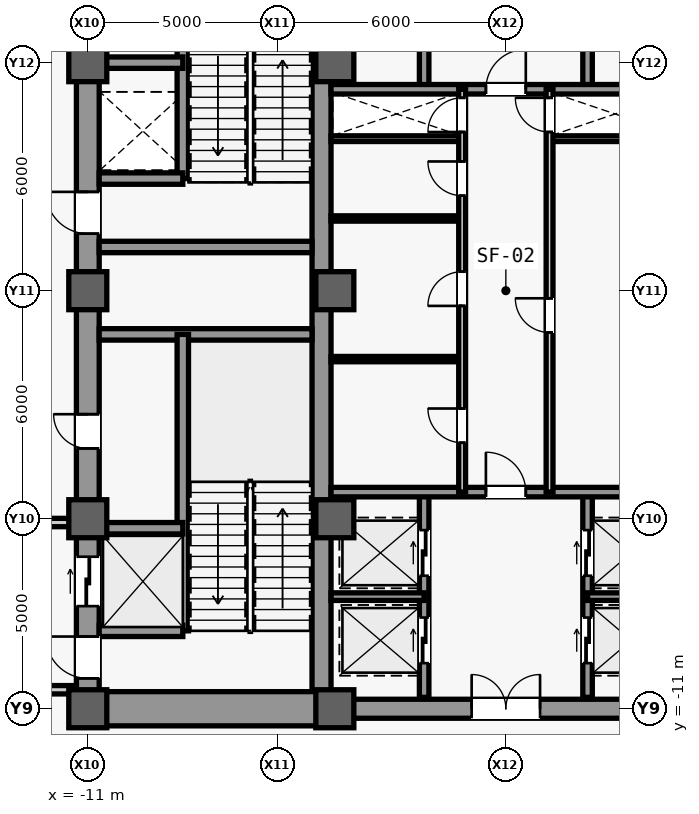
"""IFC4 building model, lengths in metres.
Left out: names, types, materials, properties, quantities, classifications, styles, units other than length and angle.
Written with IfcOpenShell. Run it as: python <this file> out.ifc"""

import sys

from ifc_helpers import new_model, si_unit, direction, frame, frame_2d, origin, origin_2d, place, context, subcontext, project, spatial, rectangle, extrude, source, transform, mapped, element, fill, save


model = new_model("IFC4")
c1 = context("Model", 3, precision=1e-05, world=origin(), true_north=direction((0.0, 1.0)))
c2 = subcontext(c1, "Body", "Model", "MODEL_VIEW")
j1 = project(units=[si_unit("LENGTHUNIT", "METRE"), si_unit("PLANEANGLEUNIT", "RADIAN")], contexts=[c1])
p1 = place(None, origin())
s1 = spatial("IfcSite", under=j1, at=p1, CompositionType="ELEMENT")
p2 = place(p1, origin())
s2 = spatial("IfcBuilding", under=s1, at=p2, CompositionType="ELEMENT")
p3 = place(p2, frame((0.0, 0.0, 6.6)))
s3 = spatial("IfcBuildingStorey", under=s2, at=p3, CompositionType="ELEMENT", Elevation=6.6)
m1 = source(origin(), c2, "Body", "SweptSolid", [
    extrude(rectangle(XDim=22.0, YDim=0.6, at=frame_2d((11.0, 0.0))), origin(), (0.0, 0.0, 1.0), 5.08),
])
p4 = place(p3, frame((-11.0, -11.0, 0.0), z_axis=(0.0, 0.0, 1.0), x_axis=(0.0, 1.0, 0.0)))
e1 = element("IfcWall", 1, at=p4, inside=s3, PredefinedType="SHEAR", context=c2, shape_type="MappedRepresentation", body=[
    mapped(m1, transform((0.0, 0.0, 0.0), scale=1.0)),
])
m2 = source(origin(), c2, "Body", "SweptSolid", [
    extrude(rectangle(XDim=1.1, YDim=2.2, at=frame_2d((0.55, 1.1))), frame((0.0, 0.31, 0.0), z_axis=(0.0, -1.0, 0.0), x_axis=(1.0, 0.0, 0.0)), (0.0, 0.0, 1.0), 0.62),
])
p5 = place(p4, frame((0.8, 0.0, 0.0)))
e2 = element("IfcOpeningElement", 2, at=p5, cuts=e1, PredefinedType="OPENING", context=c2, shape_type="MappedRepresentation", body=[
    mapped(m2, transform((0.0, 0.0, 0.0), scale=1.0)),
])
p6 = place(p4, frame((12.5, 0.0, 0.0)))
e3 = element("IfcOpeningElement", 3, at=p6, cuts=e1, PredefinedType="OPENING", context=c2, shape_type="MappedRepresentation", body=[
    mapped(m2, transform((0.0, 0.0, 0.0), scale=1.0)),
])
m3 = source(origin(), c2, "Body", "SweptSolid", [
    extrude(rectangle(XDim=0.9, YDim=2.15, at=frame_2d((0.45, 1.075))), frame((0.0, 0.31, 0.0), z_axis=(0.0, -1.0, 0.0), x_axis=(1.0, 0.0, 0.0)), (0.0, 0.0, 1.0), 0.62),
])
p7 = place(p4, frame((6.85, 0.0, 0.0)))
e4 = element("IfcOpeningElement", 4, at=p7, cuts=e1, PredefinedType="OPENING", context=c2, shape_type="MappedRepresentation", body=[
    mapped(m3, transform((0.0, 0.0, 0.0), scale=1.0)),
])
m4 = source(origin(), c2, "Body", "SweptSolid", [
    extrude(rectangle(XDim=1.3, YDim=2.3, at=frame_2d((0.65, 1.15))), frame((0.0, 0.31, 0.0), z_axis=(0.0, -1.0, 0.0), x_axis=(1.0, 0.0, 0.0)), (0.0, 0.0, 1.0), 0.62),
])
p8 = place(p4, frame((2.7, 0.0, 0.0)))
e5 = element("IfcOpeningElement", 5, at=p8, cuts=e1, PredefinedType="OPENING", context=c2, shape_type="MappedRepresentation", body=[
    mapped(m4, transform((0.0, 0.0, 0.0), scale=1.0)),
])
m5 = source(origin(), c2, "Body", "SweptSolid", [
    extrude(rectangle(XDim=21.4, YDim=0.5, at=frame_2d((10.7, 0.0))), origin(), (0.0, 0.0, 1.0), 5.08),
])
p9 = place(p3, frame((-4.85, -10.7, 0.0), z_axis=(0.0, 0.0, 1.0), x_axis=(0.0, 1.0, 0.0)))
e6 = element("IfcWall", 6, at=p9, inside=s3, PredefinedType="SHEAR", context=c2, shape_type="MappedRepresentation", body=[
    mapped(m5, transform((0.0, 0.0, 0.0), scale=1.0)),
])
m6 = source(origin(), c2, "Body", "SweptSolid", [
    extrude(rectangle(XDim=5.85, YDim=0.9, at=frame_2d((2.925, 0.0))), origin(), (0.0, 0.0, 1.0), 5.08),
])
p10 = place(p3, frame((-10.7, -11.0, 0.0), z_axis=(0.0, 0.0, 1.0), x_axis=(1.0, 0.0, 0.0)))
e7 = element("IfcWall", 7, at=p10, inside=s3, PredefinedType="SHEAR", context=c2, shape_type="MappedRepresentation", body=[
    mapped(m6, transform((0.0, 0.0, 0.0), scale=1.0)),
])
m7 = source(origin(), c2, "Body", "SweptSolid", [
    extrude(rectangle(XDim=5.6, YDim=0.3, at=frame_2d((2.8, 0.0))), origin(), (0.0, 0.0, 1.0), 5.08),
])
for number, where, z_axis, x_axis in (
    (8, (-10.7, -1.15, 0.0), (0.0, 0.0, 1.0), (1.0, 0.0, 0.0)),
    (9, (-10.7, 1.15, 0.0), (0.0, 0.0, 1.0), (1.0, 0.0, 0.0)),
):
    element("IfcWall", number, at=place(p3, frame(where, z_axis=z_axis, x_axis=x_axis)), inside=s3, PredefinedType="SHEAR", context=c2, shape_type="MappedRepresentation", body=[
        mapped(m7, transform((0.0, 0.0, 0.0), scale=1.0)),
    ])
m8 = source(origin(), c2, "Body", "SweptSolid", [
    extrude(rectangle(XDim=9.2, YDim=0.5, at=frame_2d((4.6, 0.0))), origin(), (0.0, 0.0, 1.0), 5.08),
])
p11 = place(p3, frame((-4.6, -11.0, 0.0), z_axis=(0.0, 0.0, 1.0), x_axis=(1.0, 0.0, 0.0)))
e10 = element("IfcWall", 10, at=p11, inside=s3, PredefinedType="SHEAR", context=c2, shape_type="MappedRepresentation", body=[
    mapped(m8, transform((0.0, 0.0, 0.0), scale=1.0)),
])
m9 = source(origin(), c2, "Body", "SweptSolid", [
    extrude(rectangle(XDim=1.8, YDim=2.25, at=frame_2d((0.9, 1.125))), frame((0.0, 0.26, 0.0), z_axis=(0.0, -1.0, 0.0), x_axis=(1.0, 0.0, 0.0)), (0.0, 0.0, 1.0), 0.52),
])
p12 = place(p11, frame((3.7, 0.0, 0.0)))
e11 = element("IfcOpeningElement", 11, at=p12, cuts=e10, PredefinedType="OPENING", context=c2, shape_type="MappedRepresentation", body=[
    mapped(m9, transform((0.0, 0.0, 0.0), scale=1.0)),
])
m10 = source(origin(), c2, "Body", "SweptSolid", [
    extrude(rectangle(XDim=1.0, YDim=1.0, at=origin_2d()), origin(), (0.0, 0.0, 1.0), 5.4),
])
for number, where, z_axis, x_axis in (
    (12, (-11.0, -11.0, 0.0), (0.0, 0.0, 1.0), (1.0, 0.0, 0.0)),
    (13, (-11.0, -6.0, 0.0), (0.0, 0.0, 1.0), (1.0, 0.0, 0.0)),
    (14, (-11.0, 0.0, 0.0), (0.0, 0.0, 1.0), (1.0, 0.0, 0.0)),
    (15, (-11.0, 6.0, 0.0), (0.0, 0.0, 1.0), (1.0, 0.0, 0.0)),
    (16, (-4.5, -11.0, 0.0), (0.0, 0.0, 1.0), (1.0, 0.0, 0.0)),
    (17, (-4.5, -6.0, 0.0), (0.0, 0.0, 1.0), (1.0, 0.0, 0.0)),
    (18, (-4.5, 0.0, 0.0), (0.0, 0.0, 1.0), (1.0, 0.0, 0.0)),
    (19, (-4.5, 6.0, 0.0), (0.0, 0.0, 1.0), (1.0, 0.0, 0.0)),
):
    element("IfcColumn", number, at=place(p3, frame(where, z_axis=z_axis, x_axis=x_axis)), inside=s3, PredefinedType="COLUMN", context=c2, shape_type="MappedRepresentation", body=[
        mapped(m10, transform((0.0, 0.0, 0.0), scale=1.0)),
    ])
m11 = source(origin(), c2, "Body", "SweptSolid", [
    extrude(rectangle(XDim=7.8, YDim=0.3, at=frame_2d((3.9, 0.0))), origin(), (0.0, 0.0, 1.0), 5.08),
])
p13 = place(p3, frame((-8.5, -8.95, 0.0), z_axis=(0.0, 0.0, 1.0), x_axis=(0.0, 1.0, 0.0)))
e20 = element("IfcWall", 20, at=p13, inside=s3, PredefinedType="SHEAR", context=c2, shape_type="MappedRepresentation", body=[
    mapped(m11, transform((0.0, 0.0, 0.0), scale=1.0)),
])
m12 = source(origin(), c2, "Body", "SweptSolid", [
    extrude(rectangle(XDim=2.2, YDim=0.3, at=frame_2d((1.1, 0.0))), origin(), (0.0, 0.0, 1.0), 5.08),
])
for number, where, z_axis, x_axis in (
    (21, (-10.7, -8.95, 0.0), (0.0, 0.0, 1.0), (1.0, 0.0, 0.0)),
    (22, (-10.7, -6.25, 0.0), (0.0, 0.0, 1.0), (1.0, 0.0, 0.0)),
):
    element("IfcWall", number, at=place(p3, frame(where, z_axis=z_axis, x_axis=x_axis)), inside=s3, PredefinedType="SHEAR", context=c2, shape_type="MappedRepresentation", body=[
        mapped(m12, transform((0.0, 0.0, 0.0), scale=1.0)),
    ])
m13 = source(origin(), c2, "Body", "SweptSolid", [
    extrude(rectangle(XDim=7.75, YDim=0.3, at=frame_2d((3.875, 0.0))), origin(), (0.0, 0.0, 1.0), 5.08),
])
p14 = place(p3, frame((-8.5, 2.95, 0.0), z_axis=(0.0, 0.0, 1.0), x_axis=(0.0, 1.0, 0.0)))
e23 = element("IfcWall", 23, at=p14, inside=s3, PredefinedType="SHEAR", context=c2, shape_type="MappedRepresentation", body=[
    mapped(m13, transform((0.0, 0.0, 0.0), scale=1.0)),
])
for number, where, z_axis, x_axis in (
    (24, (-10.7, 2.95, 0.0), (0.0, 0.0, 1.0), (1.0, 0.0, 0.0)),
    (25, (-10.7, 6.0, 0.0), (0.0, 0.0, 1.0), (1.0, 0.0, 0.0)),
):
    element("IfcWall", number, at=place(p3, frame(where, z_axis=z_axis, x_axis=x_axis)), inside=s3, PredefinedType="SHEAR", context=c2, shape_type="MappedRepresentation", body=[
        mapped(m12, transform((0.0, 0.0, 0.0), scale=1.0)),
    ])
m14 = source(origin(), c2, "Body", "SweptSolid", [
    extrude(rectangle(XDim=4.05, YDim=0.22, at=frame_2d((2.025, 0.0))), origin(), (0.0, 0.0, 1.0), 5.08),
])
for number, where, z_axis, x_axis in (
    (26, (-15.35, -10.5, 0.0), (0.0, 0.0, 1.0), (1.0, 0.0, 0.0)),
    (27, (-15.35, -6.1, 0.0), (0.0, 0.0, 1.0), (1.0, 0.0, 0.0)),
):
    element("IfcWall", number, at=place(p3, frame(where, z_axis=z_axis, x_axis=x_axis)), inside=s3, PredefinedType="PARTITIONING", context=c2, shape_type="MappedRepresentation", body=[
        mapped(m14, transform((0.0, 0.0, 0.0), scale=1.0)),
    ])
m15 = source(origin(), c2, "Body", "SweptSolid", [
    extrude(rectangle(XDim=3.45, YDim=0.15, at=frame_2d((1.725, 0.0))), origin(), (0.0, 0.0, 1.0), 5.08),
])
for number, where, z_axis, x_axis in (
    (28, (-4.6, 4.0, 0.0), (0.0, 0.0, 1.0), (1.0, 0.0, 0.0)),
    (29, (1.15, 4.0, 0.0), (0.0, 0.0, 1.0), (1.0, 0.0, 0.0)),
):
    element("IfcWall", number, at=place(p3, frame(where, z_axis=z_axis, x_axis=x_axis)), inside=s3, PredefinedType="PARTITIONING", context=c2, shape_type="MappedRepresentation", body=[
        mapped(m15, transform((0.0, 0.0, 0.0), scale=1.0)),
    ])
m16 = source(origin(), c2, "Body", "SweptSolid", [
    extrude(rectangle(XDim=5.4, YDim=0.25, at=frame_2d((2.7, 0.0))), origin(), (0.0, 0.0, 1.0), 5.08),
])
p15 = place(p3, frame((-2.15, -10.7, 0.0), z_axis=(0.0, 0.0, 1.0), x_axis=(0.0, 1.0, 0.0)))
e30 = element("IfcWall", 30, at=p15, inside=s3, PredefinedType="SHEAR", context=c2, shape_type="MappedRepresentation", body=[
    mapped(m16, transform((0.0, 0.0, 0.0), scale=1.0)),
])
m17 = source(origin(), c2, "Body", "SweptSolid", [
    extrude(rectangle(XDim=1.2, YDim=2.3, at=frame_2d((0.6, 1.15))), frame((0.0, 0.135, 0.0), z_axis=(0.0, -1.0, 0.0), x_axis=(1.0, 0.0, 0.0)), (0.0, 0.0, 1.0), 0.27),
])
p16 = place(p15, frame((0.9, 0.0, 0.0)))
e31 = element("IfcOpeningElement", 31, at=p16, cuts=e30, PredefinedType="OPENING", context=c2, shape_type="MappedRepresentation", body=[
    mapped(m17, transform((0.0, 0.0, 0.0), scale=1.0)),
])
p17 = place(p15, frame((3.2, 0.0, 0.0)))
e32 = element("IfcOpeningElement", 32, at=p17, cuts=e30, PredefinedType="OPENING", context=c2, shape_type="MappedRepresentation", body=[
    mapped(m17, transform((0.0, 0.0, 0.0), scale=1.0)),
])
p18 = place(p3, frame((2.15, -10.7, 0.0), z_axis=(0.0, 0.0, 1.0), x_axis=(0.0, 1.0, 0.0)))
e33 = element("IfcWall", 33, at=p18, inside=s3, PredefinedType="SHEAR", context=c2, shape_type="MappedRepresentation", body=[
    mapped(m16, transform((0.0, 0.0, 0.0), scale=1.0)),
])
p19 = place(p18, frame((0.9, 0.0, 0.0)))
e34 = element("IfcOpeningElement", 34, at=p19, cuts=e33, PredefinedType="OPENING", context=c2, shape_type="MappedRepresentation", body=[
    mapped(m17, transform((0.0, 0.0, 0.0), scale=1.0)),
])
p20 = place(p18, frame((3.2, 0.0, 0.0)))
e35 = element("IfcOpeningElement", 35, at=p20, cuts=e33, PredefinedType="OPENING", context=c2, shape_type="MappedRepresentation", body=[
    mapped(m17, transform((0.0, 0.0, 0.0), scale=1.0)),
])
m18 = source(origin(), c2, "Body", "SweptSolid", [
    extrude(rectangle(XDim=2.45, YDim=0.2, at=frame_2d((1.225, 0.0))), origin(), (0.0, 0.0, 1.0), 5.08),
])
for number, where, z_axis, x_axis in (
    (36, (-4.6, -8.05, 0.0), (0.0, 0.0, 1.0), (1.0, 0.0, 0.0)),
    (37, (2.15, -8.05, 0.0), (0.0, 0.0, 1.0), (1.0, 0.0, 0.0)),
):
    element("IfcWall", number, at=place(p3, frame(where, z_axis=z_axis, x_axis=x_axis)), inside=s3, PredefinedType="SHEAR", context=c2, shape_type="MappedRepresentation", body=[
        mapped(m18, transform((0.0, 0.0, 0.0), scale=1.0)),
    ])
m19 = source(origin(), c2, "Body", "SweptSolid", [
    extrude(rectangle(XDim=9.2, YDim=0.25, at=frame_2d((4.6, 0.0))), origin(), (0.0, 0.0, 1.0), 5.08),
])
p21 = place(p3, frame((-4.6, -5.3, 0.0), z_axis=(0.0, 0.0, 1.0), x_axis=(1.0, 0.0, 0.0)))
e38 = element("IfcWall", 38, at=p21, inside=s3, PredefinedType="SHEAR", context=c2, shape_type="MappedRepresentation", body=[
    mapped(m19, transform((0.0, 0.0, 0.0), scale=1.0)),
])
m20 = source(origin(), c2, "Body", "SweptSolid", [
    extrude(rectangle(XDim=1.05, YDim=2.2, at=frame_2d((0.525, 1.1))), frame((0.0, 0.135, 0.0), z_axis=(0.0, -1.0, 0.0), x_axis=(1.0, 0.0, 0.0)), (0.0, 0.0, 1.0), 0.27),
])
p22 = place(p21, frame((4.075, 0.0, 0.0)))
e39 = element("IfcOpeningElement", 39, at=p22, cuts=e38, PredefinedType="OPENING", context=c2, shape_type="MappedRepresentation", body=[
    mapped(m20, transform((0.0, 0.0, 0.0), scale=1.0)),
])
for number, where, z_axis, x_axis in (
    (40, (-2.15, 5.3, 0.0), (0.0, 0.0, 1.0), (0.0, 1.0, 0.0)),
    (41, (2.15, 5.3, 0.0), (0.0, 0.0, 1.0), (0.0, 1.0, 0.0)),
):
    element("IfcWall", number, at=place(p3, frame(where, z_axis=z_axis, x_axis=x_axis)), inside=s3, PredefinedType="SHEAR", context=c2, shape_type="MappedRepresentation", body=[
        mapped(m16, transform((0.0, 0.0, 0.0), scale=1.0)),
    ])
p23 = place(p3, frame((-4.6, 5.3, 0.0), z_axis=(0.0, 0.0, 1.0), x_axis=(1.0, 0.0, 0.0)))
e42 = element("IfcWall", 42, at=p23, inside=s3, PredefinedType="SHEAR", context=c2, shape_type="MappedRepresentation", body=[
    mapped(m19, transform((0.0, 0.0, 0.0), scale=1.0)),
])
p24 = place(p23, frame((4.075, 0.0, 0.0)))
e43 = element("IfcOpeningElement", 43, at=p24, cuts=e42, PredefinedType="OPENING", context=c2, shape_type="MappedRepresentation", body=[
    mapped(m20, transform((0.0, 0.0, 0.0), scale=1.0)),
])
m21 = source(origin(), c2, "Body", "SweptSolid", [
    extrude(rectangle(XDim=3.45, YDim=0.14, at=frame_2d((1.725, 0.0))), origin(), (0.0, 0.0, 1.0), 5.08),
])
for number, where, z_axis, x_axis in (
    (44, (-4.6, -1.8, 0.0), (0.0, 0.0, 1.0), (1.0, 0.0, 0.0)),
    (45, (-4.6, 1.9, 0.0), (0.0, 0.0, 1.0), (1.0, 0.0, 0.0)),
):
    element("IfcWall", number, at=place(p3, frame(where, z_axis=z_axis, x_axis=x_axis)), inside=s3, PredefinedType="PARTITIONING", context=c2, shape_type="MappedRepresentation", body=[
        mapped(m21, transform((0.0, 0.0, 0.0), scale=1.0)),
    ])
m22 = source(origin(), c2, "Body", "SweptSolid", [
    extrude(rectangle(XDim=10.6, YDim=0.18, at=frame_2d((5.3, 0.0))), origin(), (0.0, 0.0, 1.0), 5.08),
])
p25 = place(p3, frame((-1.15, -5.3, 0.0), z_axis=(0.0, 0.0, 1.0), x_axis=(0.0, 1.0, 0.0)))
e46 = element("IfcWall", 46, at=p25, inside=s3, PredefinedType="PARTITIONING", context=c2, shape_type="MappedRepresentation", body=[
    mapped(m22, transform((0.0, 0.0, 0.0), scale=1.0)),
])
m23 = source(origin(), c2, "Body", "SweptSolid", [
    extrude(rectangle(XDim=0.9, YDim=2.15, at=frame_2d((0.45, 1.075))), frame((0.0, 0.1, 0.0), z_axis=(0.0, -1.0, 0.0), x_axis=(1.0, 0.0, 0.0)), (0.0, 0.0, 1.0), 0.2),
])
p26 = place(p25, frame((1.3, 0.0, 0.0)))
e47 = element("IfcOpeningElement", 47, at=p26, cuts=e46, PredefinedType="OPENING", context=c2, shape_type="MappedRepresentation", body=[
    mapped(m23, transform((0.0, 0.0, 0.0), scale=1.0)),
])
p27 = place(p25, frame((4.9, 0.0, 0.0)))
e48 = element("IfcOpeningElement", 48, at=p27, cuts=e46, PredefinedType="OPENING", context=c2, shape_type="MappedRepresentation", body=[
    mapped(m23, transform((0.0, 0.0, 0.0), scale=1.0)),
])
p28 = place(p25, frame((7.8, 0.0, 0.0)))
e49 = element("IfcOpeningElement", 49, at=p28, cuts=e46, PredefinedType="OPENING", context=c2, shape_type="MappedRepresentation", body=[
    mapped(m23, transform((0.0, 0.0, 0.0), scale=1.0)),
])
p29 = place(p25, frame((9.475, 0.0, 0.0)))
e50 = element("IfcOpeningElement", 50, at=p29, cuts=e46, PredefinedType="OPENING", context=c2, shape_type="MappedRepresentation", body=[
    mapped(m23, transform((0.0, 0.0, 0.0), scale=1.0)),
])
p30 = place(p3, frame((1.15, -5.3, 0.0), z_axis=(0.0, 0.0, 1.0), x_axis=(0.0, 1.0, 0.0)))
e51 = element("IfcWall", 51, at=p30, inside=s3, PredefinedType="PARTITIONING", context=c2, shape_type="MappedRepresentation", body=[
    mapped(m22, transform((0.0, 0.0, 0.0), scale=1.0)),
])
p31 = place(p30, frame((4.2, 0.0, 0.0)))
e52 = element("IfcOpeningElement", 52, at=p31, cuts=e51, PredefinedType="OPENING", context=c2, shape_type="MappedRepresentation", body=[
    mapped(m23, transform((0.0, 0.0, 0.0), scale=1.0)),
])
p32 = place(p30, frame((9.475, 0.0, 0.0)))
e53 = element("IfcOpeningElement", 53, at=p32, cuts=e51, PredefinedType="OPENING", context=c2, shape_type="MappedRepresentation", body=[
    mapped(m23, transform((0.0, 0.0, 0.0), scale=1.0)),
])
m24 = source(origin(), c2, "Body", "SweptSolid", [
    extrude(rectangle(XDim=1.1, YDim=2.2, at=frame_2d((0.55, 1.1))), frame((0.0, 0.025, 0.0), z_axis=(0.0, -1.0, 0.0), x_axis=(1.0, 0.0, 0.0)), (0.0, 0.0, 1.0), 0.05),
])
p33 = place(p5, origin())
e54 = element("IfcDoor", 54, at=p33, inside=s3, OperationType="SINGLE_SWING_RIGHT", PredefinedType="DOOR", context=c2, shape_type="MappedRepresentation", body=[
    mapped(m24, transform((0.0, 0.0, 0.0), scale=1.0)),
])
fill(e2, e54)
p34 = place(p6, origin())
e55 = element("IfcDoor", 55, at=p34, inside=s3, OperationType="SINGLE_SWING_RIGHT", PredefinedType="DOOR", context=c2, shape_type="MappedRepresentation", body=[
    mapped(m24, transform((0.0, 0.0, 0.0), scale=1.0)),
])
fill(e3, e55)
m25 = source(origin(), c2, "Body", "SweptSolid", [
    extrude(rectangle(XDim=0.9, YDim=2.15, at=frame_2d((0.45, 1.075))), frame((0.0, 0.025, 0.0), z_axis=(0.0, -1.0, 0.0), x_axis=(1.0, 0.0, 0.0)), (0.0, 0.0, 1.0), 0.05),
])
p35 = place(p7, origin())
e56 = element("IfcDoor", 56, at=p35, inside=s3, OperationType="SINGLE_SWING_RIGHT", PredefinedType="DOOR", context=c2, shape_type="MappedRepresentation", body=[
    mapped(m25, transform((0.0, 0.0, 0.0), scale=1.0)),
])
fill(e4, e56)
m26 = source(origin(), c2, "Body", "SweptSolid", [
    extrude(rectangle(XDim=1.05, YDim=2.2, at=frame_2d((0.525, 1.1))), frame((0.0, 0.025, 0.0), z_axis=(0.0, -1.0, 0.0), x_axis=(1.0, 0.0, 0.0)), (0.0, 0.0, 1.0), 0.05),
])
p36 = place(p22, origin())
e57 = element("IfcDoor", 57, at=p36, inside=s3, OperationType="SINGLE_SWING_LEFT", PredefinedType="DOOR", context=c2, shape_type="MappedRepresentation", body=[
    mapped(m26, transform((0.0, 0.0, 0.0), scale=1.0)),
])
fill(e39, e57)
m27 = source(origin(), c2, "Body", "SweptSolid", [
    extrude(rectangle(XDim=1.8, YDim=2.25, at=frame_2d((0.9, 1.125))), frame((0.0, 0.025, 0.0), z_axis=(0.0, -1.0, 0.0), x_axis=(1.0, 0.0, 0.0)), (0.0, 0.0, 1.0), 0.05),
])
p37 = place(p12, origin())
e58 = element("IfcDoor", 58, at=p37, inside=s3, OperationType="SINGLE_SWING_LEFT", PredefinedType="DOOR", context=c2, shape_type="MappedRepresentation", body=[
    mapped(m27, transform((0.0, 0.0, 0.0), scale=1.0)),
])
fill(e11, e58)
p38 = place(p24, origin())
e59 = element("IfcDoor", 59, at=p38, inside=s3, OperationType="SINGLE_SWING_RIGHT", PredefinedType="DOOR", context=c2, shape_type="MappedRepresentation", body=[
    mapped(m26, transform((0.0, 0.0, 0.0), scale=1.0)),
])
fill(e43, e59)
p39 = place(p26, origin())
e60 = element("IfcDoor", 60, at=p39, inside=s3, OperationType="SINGLE_SWING_RIGHT", PredefinedType="DOOR", context=c2, shape_type="MappedRepresentation", body=[
    mapped(m25, transform((0.0, 0.0, 0.0), scale=1.0)),
])
fill(e47, e60)
p40 = place(p27, origin())
e61 = element("IfcDoor", 61, at=p40, inside=s3, OperationType="SINGLE_SWING_LEFT", PredefinedType="DOOR", context=c2, shape_type="MappedRepresentation", body=[
    mapped(m25, transform((0.0, 0.0, 0.0), scale=1.0)),
])
fill(e48, e61)
p41 = place(p28, origin())
e62 = element("IfcDoor", 62, at=p41, inside=s3, OperationType="SINGLE_SWING_RIGHT", PredefinedType="DOOR", context=c2, shape_type="MappedRepresentation", body=[
    mapped(m25, transform((0.0, 0.0, 0.0), scale=1.0)),
])
fill(e49, e62)
p42 = place(p31, origin())
e63 = element("IfcDoor", 63, at=p42, inside=s3, OperationType="SINGLE_SWING_RIGHT", PredefinedType="DOOR", context=c2, shape_type="MappedRepresentation", body=[
    mapped(m25, transform((0.0, 0.0, 0.0), scale=1.0)),
])
fill(e52, e63)
p43 = place(p29, origin())
e64 = element("IfcDoor", 64, at=p43, inside=s3, OperationType="SINGLE_SWING_LEFT", PredefinedType="DOOR", context=c2, shape_type="MappedRepresentation", body=[
    mapped(m25, transform((0.0, 0.0, 0.0), scale=1.0)),
])
fill(e50, e64)
p44 = place(p32, origin())
e65 = element("IfcDoor", 65, at=p44, inside=s3, OperationType="SINGLE_SWING_RIGHT", PredefinedType="DOOR", context=c2, shape_type="MappedRepresentation", body=[
    mapped(m25, transform((0.0, 0.0, 0.0), scale=1.0)),
])
fill(e53, e65)
m28 = source(origin(), c2, "Body", "SweptSolid", [
    extrude(rectangle(XDim=1.2, YDim=2.3, at=frame_2d((0.6, 1.15))), frame((0.0, 0.025, 0.0), z_axis=(0.0, -1.0, 0.0), x_axis=(1.0, 0.0, 0.0)), (0.0, 0.0, 1.0), 0.05),
])
p45 = place(p16, origin())
e66 = element("IfcDoor", 66, at=p45, inside=s3, OperationType="SLIDING_TO_LEFT", PredefinedType="DOOR", context=c2, shape_type="MappedRepresentation", body=[
    mapped(m28, transform((0.0, 0.0, 0.0), scale=1.0)),
])
fill(e31, e66)
p46 = place(p19, origin())
e67 = element("IfcDoor", 67, at=p46, inside=s3, OperationType="SLIDING_TO_LEFT", PredefinedType="DOOR", context=c2, shape_type="MappedRepresentation", body=[
    mapped(m28, transform((0.0, 0.0, 0.0), scale=1.0)),
])
fill(e34, e67)
p47 = place(p17, origin())
e68 = element("IfcDoor", 68, at=p47, inside=s3, OperationType="SLIDING_TO_LEFT", PredefinedType="DOOR", context=c2, shape_type="MappedRepresentation", body=[
    mapped(m28, transform((0.0, 0.0, 0.0), scale=1.0)),
])
fill(e32, e68)
p48 = place(p20, origin())
e69 = element("IfcDoor", 69, at=p48, inside=s3, OperationType="SLIDING_TO_LEFT", PredefinedType="DOOR", context=c2, shape_type="MappedRepresentation", body=[
    mapped(m28, transform((0.0, 0.0, 0.0), scale=1.0)),
])
fill(e35, e69)
m29 = source(origin(), c2, "Body", "SweptSolid", [
    extrude(rectangle(XDim=1.3, YDim=2.3, at=frame_2d((0.65, 1.15))), frame((0.0, 0.025, 0.0), z_axis=(0.0, -1.0, 0.0), x_axis=(1.0, 0.0, 0.0)), (0.0, 0.0, 1.0), 0.05),
])
p49 = place(p8, origin())
e70 = element("IfcDoor", 70, at=p49, inside=s3, OperationType="SLIDING_TO_LEFT", PredefinedType="DOOR", context=c2, shape_type="MappedRepresentation", body=[
    mapped(m29, transform((0.0, 0.0, 0.0), scale=1.0)),
])
fill(e5, e70)
save(model, sys.argv[1])
